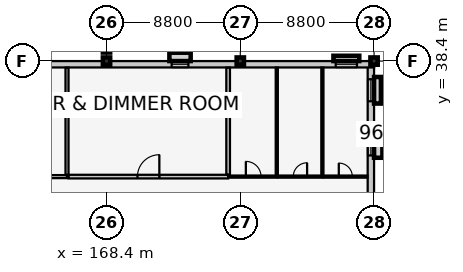
"""IFC4 building model, lengths in metres.
Left out: names, types, materials, properties, quantities, classifications, styles, units other than length and angle.
Written with IfcOpenShell. Run it as: python <this file> out.ifc"""

import sys

from ifc_helpers import new_model, si_unit, direction, frame, frame_2d, origin, origin_2d, place, context, subcontext, project, spatial, rectangle, extrude, element, fill, save


model = new_model("IFC4")
c1 = context("Model", 3, precision=1e-05, world=origin(), true_north=direction((0.0, 1.0)))
c2 = subcontext(c1, "Body", "Model", "MODEL_VIEW")
j1 = project(units=[si_unit("LENGTHUNIT", "METRE"), si_unit("PLANEANGLEUNIT", "RADIAN")], contexts=[c1])
p1 = place(None, origin())
s1 = spatial("IfcSite", under=j1, at=p1, CompositionType="ELEMENT")
p2 = place(p1, origin())
s2 = spatial("IfcBuilding", under=s1, at=p2, CompositionType="ELEMENT")
p3 = place(p2, frame((0.0, 0.0, 9.6)))
s3 = spatial("IfcBuildingStorey", under=s2, at=p3, CompositionType="ELEMENT", Elevation=9.6)
for number, where, z_axis, x_axis in (
    (1, (168.4, 38.4, 0.0), (0.0, 0.0, 1.0), (1.0, 0.0, 0.0)),
    (2, (177.2, 38.4, 0.0), (0.0, 0.0, 1.0), (1.0, 0.0, 0.0)),
    (3, (186.0, 38.4, 0.0), (0.0, 0.0, 1.0), (1.0, 0.0, 0.0)),
    (4, (168.4, 39.2, 0.0), (0.0, 0.0, 1.0), (1.0, 0.0, 0.0)),
):
    element("IfcColumn", number, at=place(p3, frame(where, z_axis=z_axis, x_axis=x_axis)), inside=s3, PredefinedType="COLUMN", context=c2, shape_type="SweptSolid", body=[
        extrude(rectangle(XDim=0.48, YDim=0.48, at=origin_2d()), origin(), (0.0, 0.0, 1.0), 4.2),
    ])
p4 = place(p3, frame((185.79, 38.4, 0.0), z_axis=(0.0, 0.0, 1.0), x_axis=(0.0, -1.0, 0.0)))
e5 = element("IfcWall", 5, at=p4, inside=s3, PredefinedType="SOLIDWALL", context=c2, shape_type="SweptSolid", body=[
    extrude(rectangle(XDim=38.4, YDim=0.42, at=frame_2d((19.2, 0.0))), origin(), (0.0, 0.0, 1.0), 3.825),
])
p5 = place(p4, frame((1.195, 0.0, 0.9)))
e6 = element("IfcOpeningElement", 6, at=p5, cuts=e5, PredefinedType="OPENING", context=c2, shape_type="SweptSolid", body=[
    extrude(rectangle(XDim=1.45, YDim=1.45, at=frame_2d((0.725, 0.725))), frame((0.0, 0.222, 0.0), z_axis=(0.0, -1.0, 0.0), x_axis=(1.0, 0.0, 0.0)), (0.0, 0.0, 1.0), 0.444),
])
p6 = place(p4, frame((5.31, 0.0, 0.9)))
e7 = element("IfcOpeningElement", 7, at=p6, cuts=e5, PredefinedType="OPENING", context=c2, shape_type="SweptSolid", body=[
    extrude(rectangle(XDim=0.9, YDim=1.6, at=frame_2d((0.45, 0.8))), frame((0.0, 0.222, 0.0), z_axis=(0.0, -1.0, 0.0), x_axis=(1.0, 0.0, 0.0)), (0.0, 0.0, 1.0), 0.444),
])
p7 = place(p3, frame((124.0, 38.19, 0.0), z_axis=(0.0, 0.0, 1.0), x_axis=(1.0, 0.0, 0.0)))
e8 = element("IfcWall", 8, at=p7, inside=s3, PredefinedType="SOLIDWALL", context=c2, shape_type="SweptSolid", body=[
    extrude(rectangle(XDim=62.0, YDim=0.42, at=frame_2d((31.0, 0.0))), origin(), (0.0, 0.0, 1.0), 3.675),
])
p8 = place(p7, frame((1.299, 0.0, 0.9)))
e9 = element("IfcOpeningElement", 9, at=p8, cuts=e8, PredefinedType="OPENING", context=c2, shape_type="SweptSolid", body=[
    extrude(rectangle(XDim=1.05, YDim=1.6, at=frame_2d((0.525, 0.8))), frame((0.0, 0.222, 0.0), z_axis=(0.0, -1.0, 0.0), x_axis=(1.0, 0.0, 0.0)), (0.0, 0.0, 1.0), 0.444),
])
p9 = place(p7, frame((4.896, 0.0, 0.9)))
e10 = element("IfcOpeningElement", 10, at=p9, cuts=e8, PredefinedType="OPENING", context=c2, shape_type="SweptSolid", body=[
    extrude(rectangle(XDim=1.15, YDim=1.6, at=frame_2d((0.575, 0.8))), frame((0.0, 0.222, 0.0), z_axis=(0.0, -1.0, 0.0), x_axis=(1.0, 0.0, 0.0)), (0.0, 0.0, 1.0), 0.444),
])
p10 = place(p7, frame((8.493, 0.0, 0.9)))
e11 = element("IfcOpeningElement", 11, at=p10, cuts=e8, PredefinedType="OPENING", context=c2, shape_type="SweptSolid", body=[
    extrude(rectangle(XDim=1.25, YDim=1.6, at=frame_2d((0.625, 0.8))), frame((0.0, 0.222, 0.0), z_axis=(0.0, -1.0, 0.0), x_axis=(1.0, 0.0, 0.0)), (0.0, 0.0, 1.0), 0.444),
])
p11 = place(p7, frame((12.075, 0.0, 0.9)))
e12 = element("IfcOpeningElement", 12, at=p11, cuts=e8, PredefinedType="OPENING", context=c2, shape_type="SweptSolid", body=[
    extrude(rectangle(XDim=1.38, YDim=1.6, at=frame_2d((0.69, 0.8))), frame((0.0, 0.222, 0.0), z_axis=(0.0, -1.0, 0.0), x_axis=(1.0, 0.0, 0.0)), (0.0, 0.0, 1.0), 0.444),
])
p12 = place(p7, frame((15.662, 0.0, 0.9)))
e13 = element("IfcOpeningElement", 13, at=p12, cuts=e8, PredefinedType="OPENING", context=c2, shape_type="SweptSolid", body=[
    extrude(rectangle(XDim=1.5, YDim=1.6, at=frame_2d((0.75, 0.8))), frame((0.0, 0.222, 0.0), z_axis=(0.0, -1.0, 0.0), x_axis=(1.0, 0.0, 0.0)), (0.0, 0.0, 1.0), 0.444),
])
p13 = place(p7, frame((19.559, 0.0, 0.9)))
e14 = element("IfcOpeningElement", 14, at=p13, cuts=e8, PredefinedType="OPENING", context=c2, shape_type="SweptSolid", body=[
    extrude(rectangle(XDim=1.0, YDim=1.75, at=frame_2d((0.5, 0.875))), frame((0.0, 0.222, 0.0), z_axis=(0.0, -1.0, 0.0), x_axis=(1.0, 0.0, 0.0)), (0.0, 0.0, 1.0), 0.444),
])
p14 = place(p7, frame((26.733, 0.0, 0.9)))
e15 = element("IfcOpeningElement", 15, at=p14, cuts=e8, PredefinedType="OPENING", context=c2, shape_type="SweptSolid", body=[
    extrude(rectangle(XDim=1.24, YDim=1.75, at=frame_2d((0.62, 0.875))), frame((0.0, 0.222, 0.0), z_axis=(0.0, -1.0, 0.0), x_axis=(1.0, 0.0, 0.0)), (0.0, 0.0, 1.0), 0.444),
])
p15 = place(p7, frame((37.544, 0.0, 0.9)))
e16 = element("IfcOpeningElement", 16, at=p15, cuts=e8, PredefinedType="OPENING", context=c2, shape_type="SweptSolid", body=[
    extrude(rectangle(XDim=1.5, YDim=1.75, at=frame_2d((0.75, 0.875))), frame((0.0, 0.222, 0.0), z_axis=(0.0, -1.0, 0.0), x_axis=(1.0, 0.0, 0.0)), (0.0, 0.0, 1.0), 0.444),
])
p16 = place(p7, frame((48.685, 0.0, 0.9)))
e17 = element("IfcOpeningElement", 17, at=p16, cuts=e8, PredefinedType="OPENING", context=c2, shape_type="SweptSolid", body=[
    extrude(rectangle(XDim=1.1, YDim=1.35, at=frame_2d((0.55, 0.675))), frame((0.0, 0.222, 0.0), z_axis=(0.0, -1.0, 0.0), x_axis=(1.0, 0.0, 0.0)), (0.0, 0.0, 1.0), 0.444),
])
p17 = place(p7, frame((59.477, 0.0, 0.9)))
e18 = element("IfcOpeningElement", 18, at=p17, cuts=e8, PredefinedType="OPENING", context=c2, shape_type="SweptSolid", body=[
    extrude(rectangle(XDim=1.4, YDim=1.35, at=frame_2d((0.7, 0.675))), frame((0.0, 0.222, 0.0), z_axis=(0.0, -1.0, 0.0), x_axis=(1.0, 0.0, 0.0)), (0.0, 0.0, 1.0), 0.444),
])
p18 = place(p3, frame((155.46, 30.8, 0.0), z_axis=(0.0, 0.0, 1.0), x_axis=(1.0, 0.0, 0.0)))
e19 = element("IfcWall", 19, at=p18, inside=s3, PredefinedType="PARTITIONING", context=c2, shape_type="SweptSolid", body=[
    extrude(rectangle(XDim=10.34, YDim=0.2, at=frame_2d((5.17, 0.0))), origin(), (0.0, 0.0, 1.0), 3.95),
])
p19 = place(p18, frame((4.51, 0.0, 0.0)))
e20 = element("IfcOpeningElement", 20, at=p19, cuts=e19, PredefinedType="OPENING", context=c2, shape_type="SweptSolid", body=[
    extrude(rectangle(XDim=1.32, YDim=2.15, at=frame_2d((0.66, 1.075))), frame((0.0, 0.112, 0.0), z_axis=(0.0, -1.0, 0.0), x_axis=(1.0, 0.0, 0.0)), (0.0, 0.0, 1.0), 0.224),
])
p20 = place(p3, frame((165.8, 30.91, 0.0), z_axis=(0.0, 0.0, 1.0), x_axis=(0.0, 1.0, 0.0)))
e21 = element("IfcWall", 21, at=p20, inside=s3, PredefinedType="PARTITIONING", context=c2, shape_type="SweptSolid", body=[
    extrude(rectangle(XDim=7.06, YDim=0.2, at=frame_2d((3.53, 0.0))), origin(), (0.0, 0.0, 1.0), 3.95),
])
p21 = place(p3, frame((165.91, 30.8, 0.0), z_axis=(0.0, 0.0, 1.0), x_axis=(1.0, 0.0, 0.0)))
e22 = element("IfcWall", 22, at=p21, inside=s3, PredefinedType="PARTITIONING", context=c2, shape_type="SweptSolid", body=[
    extrude(rectangle(XDim=10.49, YDim=0.24, at=frame_2d((5.245, 0.0))), origin(), (0.0, 0.0, 1.0), 3.95),
])
p22 = place(p21, frame((4.525, 0.0, 0.0)))
e23 = element("IfcOpeningElement", 23, at=p22, cuts=e22, PredefinedType="OPENING", context=c2, shape_type="SweptSolid", body=[
    extrude(rectangle(XDim=1.44, YDim=2.2, at=frame_2d((0.72, 1.1))), frame((0.0, 0.132, 0.0), z_axis=(0.0, -1.0, 0.0), x_axis=(1.0, 0.0, 0.0)), (0.0, 0.0, 1.0), 0.264),
])
p23 = place(p3, frame((176.4, 30.93, 0.0), z_axis=(0.0, 0.0, 1.0), x_axis=(0.0, 1.0, 0.0)))
e24 = element("IfcWall", 24, at=p23, inside=s3, PredefinedType="PARTITIONING", context=c2, shape_type="SweptSolid", body=[
    extrude(rectangle(XDim=7.04, YDim=0.24, at=frame_2d((3.52, 0.0))), origin(), (0.0, 0.0, 1.0), 3.95),
])
p24 = place(p3, frame((176.53, 30.8, 0.0), z_axis=(0.0, 0.0, 1.0), x_axis=(1.0, 0.0, 0.0)))
e25 = element("IfcWall", 25, at=p24, inside=s3, PredefinedType="PARTITIONING", context=c2, shape_type="SweptSolid", body=[
    extrude(rectangle(XDim=3.07, YDim=0.14, at=frame_2d((1.535, 0.0))), origin(), (0.0, 0.0, 1.0), 3.95),
])
p25 = place(p24, frame((1.035, 0.0, 0.0)))
e26 = element("IfcOpeningElement", 26, at=p25, cuts=e25, PredefinedType="OPENING", context=c2, shape_type="SweptSolid", body=[
    extrude(rectangle(XDim=1.0, YDim=2.1, at=frame_2d((0.5, 1.05))), frame((0.0, 0.082, 0.0), z_axis=(0.0, -1.0, 0.0), x_axis=(1.0, 0.0, 0.0)), (0.0, 0.0, 1.0), 0.164),
])
p26 = place(p3, frame((179.6, 30.88, 0.0), z_axis=(0.0, 0.0, 1.0), x_axis=(0.0, 1.0, 0.0)))
e27 = element("IfcWall", 27, at=p26, inside=s3, PredefinedType="PARTITIONING", context=c2, shape_type="SweptSolid", body=[
    extrude(rectangle(XDim=7.09, YDim=0.14, at=frame_2d((3.545, 0.0))), origin(), (0.0, 0.0, 1.0), 3.95),
])
p27 = place(p3, frame((179.68, 30.8, 0.0), z_axis=(0.0, 0.0, 1.0), x_axis=(1.0, 0.0, 0.0)))
e28 = element("IfcWall", 28, at=p27, inside=s3, PredefinedType="PARTITIONING", context=c2, shape_type="SweptSolid", body=[
    extrude(rectangle(XDim=2.92, YDim=0.14, at=frame_2d((1.46, 0.0))), origin(), (0.0, 0.0, 1.0), 3.95),
])
p28 = place(p27, frame((1.005, 0.0, 0.0)))
e29 = element("IfcOpeningElement", 29, at=p28, cuts=e28, PredefinedType="OPENING", context=c2, shape_type="SweptSolid", body=[
    extrude(rectangle(XDim=0.91, YDim=2.06, at=frame_2d((0.455, 1.03))), frame((0.0, 0.082, 0.0), z_axis=(0.0, -1.0, 0.0), x_axis=(1.0, 0.0, 0.0)), (0.0, 0.0, 1.0), 0.164),
])
p29 = place(p3, frame((182.6, 30.88, 0.0), z_axis=(0.0, 0.0, 1.0), x_axis=(0.0, 1.0, 0.0)))
e30 = element("IfcWall", 30, at=p29, inside=s3, PredefinedType="PARTITIONING", context=c2, shape_type="SweptSolid", body=[
    extrude(rectangle(XDim=7.09, YDim=0.14, at=frame_2d((3.545, 0.0))), origin(), (0.0, 0.0, 1.0), 3.95),
])
p30 = place(p3, frame((182.68, 30.8, 0.0), z_axis=(0.0, 0.0, 1.0), x_axis=(1.0, 0.0, 0.0)))
e31 = element("IfcWall", 31, at=p30, inside=s3, PredefinedType="PARTITIONING", context=c2, shape_type="SweptSolid", body=[
    extrude(rectangle(XDim=2.89, YDim=0.14, at=frame_2d((1.445, 0.0))), origin(), (0.0, 0.0, 1.0), 3.95),
])
p31 = place(p30, frame((1.0, 0.0, 0.0)))
e32 = element("IfcOpeningElement", 32, at=p31, cuts=e31, PredefinedType="OPENING", context=c2, shape_type="SweptSolid", body=[
    extrude(rectangle(XDim=0.89, YDim=2.05, at=frame_2d((0.445, 1.025))), frame((0.0, 0.082, 0.0), z_axis=(0.0, -1.0, 0.0), x_axis=(1.0, 0.0, 0.0)), (0.0, 0.0, 1.0), 0.164),
])
p32 = place(p5, origin())
e33 = element("IfcWindow", 33, at=p32, inside=s3, PartitioningType="SINGLE_PANEL", PredefinedType="WINDOW", context=c2, shape_type="SweptSolid", body=[
    extrude(rectangle(XDim=1.45, YDim=1.45, at=frame_2d((0.725, 0.725))), frame((0.0, 0.03, 0.0), z_axis=(0.0, -1.0, 0.0), x_axis=(1.0, 0.0, 0.0)), (0.0, 0.0, 1.0), 0.06),
])
fill(e6, e33)
p33 = place(p6, origin())
e34 = element("IfcWindow", 34, at=p33, inside=s3, PartitioningType="SINGLE_PANEL", PredefinedType="WINDOW", context=c2, shape_type="SweptSolid", body=[
    extrude(rectangle(XDim=0.9, YDim=1.6, at=frame_2d((0.45, 0.8))), frame((0.0, 0.03, 0.0), z_axis=(0.0, -1.0, 0.0), x_axis=(1.0, 0.0, 0.0)), (0.0, 0.0, 1.0), 0.06),
])
fill(e7, e34)
p34 = place(p16, origin())
e35 = element("IfcWindow", 35, at=p34, inside=s3, PartitioningType="SINGLE_PANEL", PredefinedType="WINDOW", context=c2, shape_type="SweptSolid", body=[
    extrude(rectangle(XDim=1.1, YDim=1.35, at=frame_2d((0.55, 0.675))), frame((0.0, 0.03, 0.0), z_axis=(0.0, -1.0, 0.0), x_axis=(1.0, 0.0, 0.0)), (0.0, 0.0, 1.0), 0.06),
])
fill(e17, e35)
p35 = place(p17, origin())
e36 = element("IfcWindow", 36, at=p35, inside=s3, PartitioningType="SINGLE_PANEL", PredefinedType="WINDOW", context=c2, shape_type="SweptSolid", body=[
    extrude(rectangle(XDim=1.4, YDim=1.35, at=frame_2d((0.7, 0.675))), frame((0.0, 0.03, 0.0), z_axis=(0.0, -1.0, 0.0), x_axis=(1.0, 0.0, 0.0)), (0.0, 0.0, 1.0), 0.06),
])
fill(e18, e36)
p36 = place(p22, origin())
e37 = element("IfcDoor", 37, at=p36, inside=s3, OperationType="SINGLE_SWING_RIGHT", PredefinedType="DOOR", context=c2, shape_type="SweptSolid", body=[
    extrude(rectangle(XDim=1.44, YDim=2.2, at=frame_2d((0.72, 1.1))), frame((0.0, 0.025, 0.0), z_axis=(0.0, -1.0, 0.0), x_axis=(1.0, 0.0, 0.0)), (0.0, 0.0, 1.0), 0.05),
])
fill(e23, e37)
p37 = place(p25, origin())
e38 = element("IfcDoor", 38, at=p37, inside=s3, OperationType="SINGLE_SWING_LEFT", PredefinedType="DOOR", context=c2, shape_type="SweptSolid", body=[
    extrude(rectangle(XDim=1.0, YDim=2.1, at=frame_2d((0.5, 1.05))), frame((0.0, 0.025, 0.0), z_axis=(0.0, -1.0, 0.0), x_axis=(1.0, 0.0, 0.0)), (0.0, 0.0, 1.0), 0.05),
])
fill(e26, e38)
p38 = place(p28, origin())
e39 = element("IfcDoor", 39, at=p38, inside=s3, OperationType="SINGLE_SWING_RIGHT", PredefinedType="DOOR", context=c2, shape_type="SweptSolid", body=[
    extrude(rectangle(XDim=0.91, YDim=2.06, at=frame_2d((0.455, 1.03))), frame((0.0, 0.025, 0.0), z_axis=(0.0, -1.0, 0.0), x_axis=(1.0, 0.0, 0.0)), (0.0, 0.0, 1.0), 0.05),
])
fill(e29, e39)
p39 = place(p31, origin())
e40 = element("IfcDoor", 40, at=p39, inside=s3, OperationType="SINGLE_SWING_LEFT", PredefinedType="DOOR", context=c2, shape_type="SweptSolid", body=[
    extrude(rectangle(XDim=0.89, YDim=2.05, at=frame_2d((0.445, 1.025))), frame((0.0, 0.025, 0.0), z_axis=(0.0, -1.0, 0.0), x_axis=(1.0, 0.0, 0.0)), (0.0, 0.0, 1.0), 0.05),
])
fill(e32, e40)
save(model, sys.argv[1])
